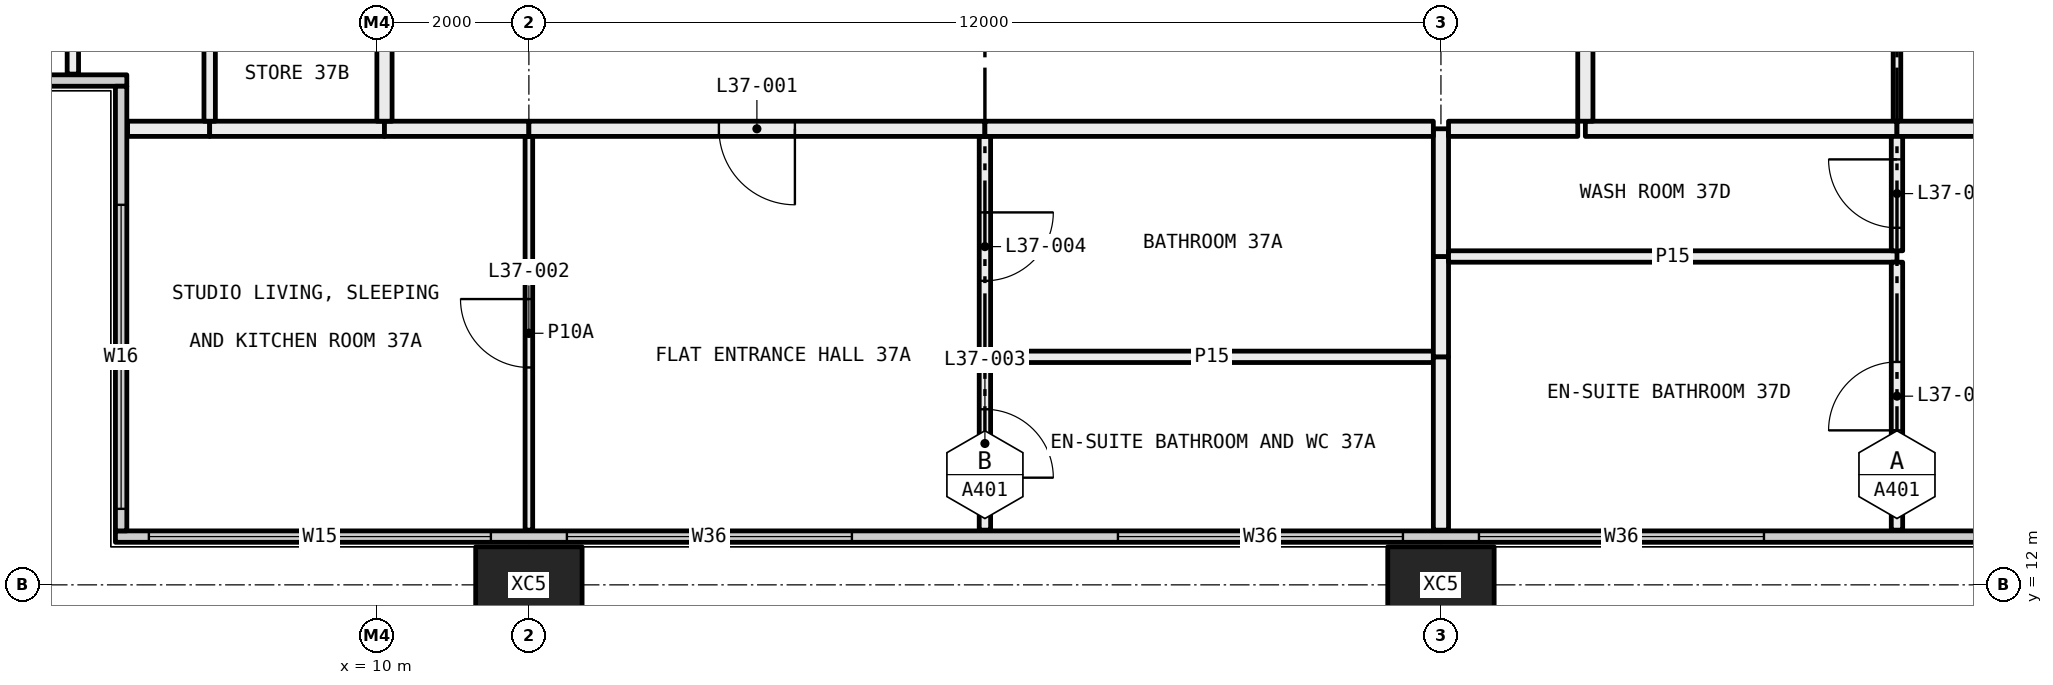
"""IFC4 building model, lengths in metres.
Left out: names, types, materials, properties, quantities, classifications, styles, units other than length and angle.
Written with IfcOpenShell. Run it as: python <this file> out.ifc"""

import sys

from ifc_helpers import new_model, si_unit, direction, frame, frame_2d, origin, origin_2d, place, context, subcontext, project, spatial, rectangle, hollow_rectangle, extrude, element, fill, save


model = new_model("IFC4")
c1 = context("Model", 3, precision=1e-05, world=origin(), true_north=direction((0.0, 1.0)))
c2 = subcontext(c1, "Body", "Model", "MODEL_VIEW")
j1 = project(units=[si_unit("LENGTHUNIT", "METRE"), si_unit("PLANEANGLEUNIT", "RADIAN")], contexts=[c1])
p1 = place(None, origin())
s1 = spatial("IfcSite", under=j1, at=p1, CompositionType="ELEMENT")
p2 = place(p1, origin())
s2 = spatial("IfcBuilding", under=s1, at=p2, CompositionType="ELEMENT")
p3 = place(p2, frame((0.0, 0.0, 141.45)))
s3 = spatial("IfcBuildingStorey", under=s2, at=p3, CompositionType="ELEMENT", Elevation=141.45)
for number, where, z_axis, x_axis in (
    (1, (12.0, 12.0, -0.4), (0.0, 0.0, 1.0), (1.0, 0.0, 0.0)),
    (2, (24.0, 12.0, -0.4), (0.0, 0.0, 1.0), (1.0, 0.0, 0.0)),
):
    element("IfcColumn", number, at=place(p3, frame(where, z_axis=z_axis, x_axis=x_axis)), inside=s3, PredefinedType="COLUMN", context=c2, shape_type="SweptSolid", body=[
        extrude(hollow_rectangle(XDim=1.4, YDim=1.0, WallThickness=0.055, at=origin_2d()), origin(), (0.0, 0.0, 1.0), 3.45),
    ])
p4 = place(p3, frame((6.56, 12.635, 0.0), z_axis=(0.0, 0.0, 1.0), x_axis=(1.0, 0.0, 0.0)))
e3 = element("IfcWall", 3, at=p4, inside=s3, PredefinedType="ELEMENTEDWALL", context=c2, shape_type="SweptSolid", body=[
    extrude(rectangle(XDim=58.88, YDim=0.15, at=frame_2d((29.44, 0.0))), origin(), (0.0, 0.0, 1.0), 3.05),
])
p5 = place(p4, frame((0.44, 0.0, 0.45)))
e4 = element("IfcOpeningElement", 4, at=p5, cuts=e3, PredefinedType="OPENING", context=c2, shape_type="SweptSolid", body=[
    extrude(rectangle(XDim=4.5, YDim=2.55, at=frame_2d((2.25, 1.275))), frame((0.0, 0.085, 0.0), z_axis=(0.0, -1.0, 0.0), x_axis=(1.0, 0.0, 0.0)), (0.0, 0.0, 1.0), 0.17),
])
p6 = place(p4, frame((5.94, 0.0, 0.45)))
e5 = element("IfcOpeningElement", 5, at=p6, cuts=e3, PredefinedType="OPENING", context=c2, shape_type="SweptSolid", body=[
    extrude(rectangle(XDim=3.75, YDim=2.55, at=frame_2d((1.875, 1.275))), frame((0.0, 0.085, 0.0), z_axis=(0.0, -1.0, 0.0), x_axis=(1.0, 0.0, 0.0)), (0.0, 0.0, 1.0), 0.17),
])
p7 = place(p4, frame((13.19, 0.0, 0.45)))
e6 = element("IfcOpeningElement", 6, at=p7, cuts=e3, PredefinedType="OPENING", context=c2, shape_type="SweptSolid", body=[
    extrude(rectangle(XDim=3.75, YDim=2.55, at=frame_2d((1.875, 1.275))), frame((0.0, 0.085, 0.0), z_axis=(0.0, -1.0, 0.0), x_axis=(1.0, 0.0, 0.0)), (0.0, 0.0, 1.0), 0.17),
])
p8 = place(p4, frame((17.94, 0.0, 0.45)))
e7 = element("IfcOpeningElement", 7, at=p8, cuts=e3, PredefinedType="OPENING", context=c2, shape_type="SweptSolid", body=[
    extrude(rectangle(XDim=3.75, YDim=2.55, at=frame_2d((1.875, 1.275))), frame((0.0, 0.085, 0.0), z_axis=(0.0, -1.0, 0.0), x_axis=(1.0, 0.0, 0.0)), (0.0, 0.0, 1.0), 0.17),
])
p9 = place(p4, frame((25.19, 0.0, 0.45)))
e8 = element("IfcOpeningElement", 8, at=p9, cuts=e3, PredefinedType="OPENING", context=c2, shape_type="SweptSolid", body=[
    extrude(rectangle(XDim=0.75, YDim=2.55, at=frame_2d((0.375, 1.275))), frame((0.0, 0.085, 0.0), z_axis=(0.0, -1.0, 0.0), x_axis=(1.0, 0.0, 0.0)), (0.0, 0.0, 1.0), 0.17),
])
p10 = place(p4, frame((26.94, 0.0, 0.45)))
e9 = element("IfcOpeningElement", 9, at=p10, cuts=e3, PredefinedType="OPENING", context=c2, shape_type="SweptSolid", body=[
    extrude(rectangle(XDim=2.0, YDim=2.55, at=frame_2d((1.0, 1.275))), frame((0.0, 0.085, 0.0), z_axis=(0.0, -1.0, 0.0), x_axis=(1.0, 0.0, 0.0)), (0.0, 0.0, 1.0), 0.17),
])
p11 = place(p4, frame((29.94, 0.0, 0.45)))
e10 = element("IfcOpeningElement", 10, at=p11, cuts=e3, PredefinedType="OPENING", context=c2, shape_type="SweptSolid", body=[
    extrude(rectangle(XDim=3.75, YDim=2.55, at=frame_2d((1.875, 1.275))), frame((0.0, 0.085, 0.0), z_axis=(0.0, -1.0, 0.0), x_axis=(1.0, 0.0, 0.0)), (0.0, 0.0, 1.0), 0.17),
])
p12 = place(p4, frame((37.19, 0.0, 0.45)))
e11 = element("IfcOpeningElement", 11, at=p12, cuts=e3, PredefinedType="OPENING", context=c2, shape_type="SweptSolid", body=[
    extrude(rectangle(XDim=3.75, YDim=2.55, at=frame_2d((1.875, 1.275))), frame((0.0, 0.085, 0.0), z_axis=(0.0, -1.0, 0.0), x_axis=(1.0, 0.0, 0.0)), (0.0, 0.0, 1.0), 0.17),
])
p13 = place(p4, frame((41.94, 0.0, 0.45)))
e12 = element("IfcOpeningElement", 12, at=p13, cuts=e3, PredefinedType="OPENING", context=c2, shape_type="SweptSolid", body=[
    extrude(rectangle(XDim=3.75, YDim=2.55, at=frame_2d((1.875, 1.275))), frame((0.0, 0.085, 0.0), z_axis=(0.0, -1.0, 0.0), x_axis=(1.0, 0.0, 0.0)), (0.0, 0.0, 1.0), 0.17),
])
p14 = place(p4, frame((49.19, 0.0, 0.45)))
e13 = element("IfcOpeningElement", 13, at=p14, cuts=e3, PredefinedType="OPENING", context=c2, shape_type="SweptSolid", body=[
    extrude(rectangle(XDim=0.75, YDim=2.55, at=frame_2d((0.375, 1.275))), frame((0.0, 0.085, 0.0), z_axis=(0.0, -1.0, 0.0), x_axis=(1.0, 0.0, 0.0)), (0.0, 0.0, 1.0), 0.17),
])
p15 = place(p4, frame((50.94, 0.0, 0.45)))
e14 = element("IfcOpeningElement", 14, at=p15, cuts=e3, PredefinedType="OPENING", context=c2, shape_type="SweptSolid", body=[
    extrude(rectangle(XDim=2.0, YDim=2.55, at=frame_2d((1.0, 1.275))), frame((0.0, 0.085, 0.0), z_axis=(0.0, -1.0, 0.0), x_axis=(1.0, 0.0, 0.0)), (0.0, 0.0, 1.0), 0.17),
])
p16 = place(p4, frame((53.94, 0.0, 0.45)))
e15 = element("IfcOpeningElement", 15, at=p16, cuts=e3, PredefinedType="OPENING", context=c2, shape_type="SweptSolid", body=[
    extrude(rectangle(XDim=4.5, YDim=2.55, at=frame_2d((2.25, 1.275))), frame((0.0, 0.085, 0.0), z_axis=(0.0, -1.0, 0.0), x_axis=(1.0, 0.0, 0.0)), (0.0, 0.0, 1.0), 0.17),
])
p17 = place(p3, frame((0.56, 18.635, 0.0), z_axis=(0.0, 0.0, 1.0), x_axis=(1.0, 0.0, 0.0)))
e16 = element("IfcWall", 16, at=p17, inside=s3, PredefinedType="ELEMENTEDWALL", context=c2, shape_type="SweptSolid", body=[
    extrude(rectangle(XDim=6.15, YDim=0.15, at=frame_2d((3.075, 0.0))), origin(), (0.0, 0.0, 1.0), 3.05),
])
p18 = place(p17, frame((0.44, 0.0, 0.45)))
e17 = element("IfcOpeningElement", 17, at=p18, cuts=e16, PredefinedType="OPENING", context=c2, shape_type="SweptSolid", body=[
    extrude(rectangle(XDim=4.0, YDim=2.55, at=frame_2d((2.0, 1.275))), frame((0.0, 0.085, 0.0), z_axis=(0.0, -1.0, 0.0), x_axis=(1.0, 0.0, 0.0)), (0.0, 0.0, 1.0), 0.17),
])
p19 = place(p3, frame((6.635, 12.71, 0.0), z_axis=(0.0, 0.0, 1.0), x_axis=(0.0, 1.0, 0.0)))
e18 = element("IfcWall", 18, at=p19, inside=s3, PredefinedType="ELEMENTEDWALL", context=c2, shape_type="SweptSolid", body=[
    extrude(rectangle(XDim=5.85, YDim=0.15, at=frame_2d((2.925, 0.0))), origin(), (0.0, 0.0, 1.0), 3.05),
])
p20 = place(p19, frame((0.29, 0.0, 0.45)))
e19 = element("IfcOpeningElement", 19, at=p20, cuts=e18, PredefinedType="OPENING", context=c2, shape_type="SweptSolid", body=[
    extrude(rectangle(XDim=4.0, YDim=2.55, at=frame_2d((2.0, 1.275))), frame((0.0, 0.085, 0.0), z_axis=(0.0, -1.0, 0.0), x_axis=(1.0, 0.0, 0.0)), (0.0, 0.0, 1.0), 0.17),
])
p21 = place(p3, frame((12.0, 12.72, 0.0), z_axis=(0.0, 0.0, 1.0), x_axis=(0.0, 1.0, 0.0)))
e20 = element("IfcWall", 20, at=p21, inside=s3, PredefinedType="PARTITIONING", context=c2, shape_type="SweptSolid", body=[
    extrude(rectangle(XDim=5.18, YDim=0.1, at=frame_2d((2.59, 0.0))), origin(), (0.0, 0.0, 1.0), 3.05),
])
p22 = place(p21, frame((2.14, 0.0, 0.0)))
e21 = element("IfcOpeningElement", 21, at=p22, cuts=e20, PredefinedType="OPENING", context=c2, shape_type="SweptSolid", body=[
    extrude(rectangle(XDim=0.9, YDim=2.1, at=frame_2d((0.45, 1.05))), frame((0.0, 0.06, 0.0), z_axis=(0.0, -1.0, 0.0), x_axis=(1.0, 0.0, 0.0)), (0.0, 0.0, 1.0), 0.12),
])
p23 = place(p3, frame((7.8, 18.0, 0.0), z_axis=(0.0, 0.0, 1.0), x_axis=(-1.0, 0.0, 0.0)))
e22 = element("IfcWall", 22, at=p23, inside=s3, PredefinedType="PARTITIONING", context=c2, shape_type="SweptSolid", body=[
    extrude(rectangle(XDim=1.08, YDim=0.2, at=frame_2d((0.54, 0.0))), origin(), (0.0, 0.0, 1.0), 3.05),
])
p24 = place(p3, frame((10.1, 18.0, 0.0), z_axis=(0.0, 0.0, 1.0), x_axis=(-1.0, 0.0, 0.0)))
e23 = element("IfcWall", 23, at=p24, inside=s3, PredefinedType="PARTITIONING", context=c2, shape_type="SweptSolid", body=[
    extrude(rectangle(XDim=2.3, YDim=0.2, at=frame_2d((1.15, 0.0))), origin(), (0.0, 0.0, 1.0), 3.05),
])
p25 = place(p3, frame((12.0, 18.0, 0.0), z_axis=(0.0, 0.0, 1.0), x_axis=(-1.0, 0.0, 0.0)))
e24 = element("IfcWall", 24, at=p25, inside=s3, PredefinedType="PARTITIONING", context=c2, shape_type="SweptSolid", body=[
    extrude(rectangle(XDim=1.9, YDim=0.2, at=frame_2d((0.95, 0.0))), origin(), (0.0, 0.0, 1.0), 3.05),
])
p26 = place(p3, frame((18.0, 12.72, 0.0), z_axis=(0.0, 0.0, 1.0), x_axis=(0.0, 1.0, 0.0)))
e25 = element("IfcWall", 25, at=p26, inside=s3, PredefinedType="PARTITIONING", context=c2, shape_type="SweptSolid", body=[
    extrude(rectangle(XDim=2.28, YDim=0.15, at=frame_2d((1.14, 0.0))), origin(), (0.0, 0.0, 1.0), 3.05),
])
p27 = place(p26, frame((0.69, 0.0, 0.0)))
e26 = element("IfcOpeningElement", 26, at=p27, cuts=e25, PredefinedType="OPENING", context=c2, shape_type="SweptSolid", body=[
    extrude(rectangle(XDim=0.9, YDim=2.1, at=frame_2d((0.45, 1.05))), frame((0.0, 0.085, 0.0), z_axis=(0.0, -1.0, 0.0), x_axis=(1.0, 0.0, 0.0)), (0.0, 0.0, 1.0), 0.17),
])
p28 = place(p3, frame((18.0, 15.0, 0.0), z_axis=(0.0, 0.0, 1.0), x_axis=(0.0, 1.0, 0.0)))
e27 = element("IfcWall", 27, at=p28, inside=s3, PredefinedType="PARTITIONING", context=c2, shape_type="SweptSolid", body=[
    extrude(rectangle(XDim=2.9, YDim=0.15, at=frame_2d((1.45, 0.0))), origin(), (0.0, 0.0, 1.0), 3.05),
])
p29 = place(p28, frame((1.0, 0.0, 0.0)))
e28 = element("IfcOpeningElement", 28, at=p29, cuts=e27, PredefinedType="OPENING", context=c2, shape_type="SweptSolid", body=[
    extrude(rectangle(XDim=0.9, YDim=2.1, at=frame_2d((0.45, 1.05))), frame((0.0, 0.085, 0.0), z_axis=(0.0, -1.0, 0.0), x_axis=(1.0, 0.0, 0.0)), (0.0, 0.0, 1.0), 0.17),
])
p30 = place(p3, frame((18.0, 18.0, 0.0), z_axis=(0.0, 0.0, 1.0), x_axis=(-1.0, 0.0, 0.0)))
e29 = element("IfcWall", 29, at=p30, inside=s3, PredefinedType="PARTITIONING", context=c2, shape_type="SweptSolid", body=[
    extrude(rectangle(XDim=6.0, YDim=0.2, at=frame_2d((3.0, 0.0))), origin(), (0.0, 0.0, 1.0), 3.05),
])
p31 = place(p30, frame((2.5, 0.0, 0.0)))
e30 = element("IfcOpeningElement", 30, at=p31, cuts=e29, PredefinedType="OPENING", context=c2, shape_type="SweptSolid", body=[
    extrude(rectangle(XDim=1.0, YDim=2.1, at=frame_2d((0.5, 1.05))), frame((0.0, 0.11, 0.0), z_axis=(0.0, -1.0, 0.0), x_axis=(1.0, 0.0, 0.0)), (0.0, 0.0, 1.0), 0.22),
])
p32 = place(p3, frame((23.9, 15.0, 0.0), z_axis=(0.0, 0.0, 1.0), x_axis=(-1.0, 0.0, 0.0)))
e31 = element("IfcWall", 31, at=p32, inside=s3, PredefinedType="PARTITIONING", context=c2, shape_type="SweptSolid", body=[
    extrude(rectangle(XDim=5.825, YDim=0.15, at=frame_2d((2.913, 0.0))), origin(), (0.0, 0.0, 1.0), 3.05),
])
p33 = place(p3, frame((24.0, 12.72, 0.0), z_axis=(0.0, 0.0, 1.0), x_axis=(0.0, 1.0, 0.0)))
e32 = element("IfcWall", 32, at=p33, inside=s3, PredefinedType="PARTITIONING", context=c2, shape_type="SweptSolid", body=[
    extrude(rectangle(XDim=2.28, YDim=0.2, at=frame_2d((1.14, 0.0))), origin(), (0.0, 0.0, 1.0), 3.05),
])
p34 = place(p3, frame((24.0, 15.0, 0.0), z_axis=(0.0, 0.0, 1.0), x_axis=(0.0, 1.0, 0.0)))
e33 = element("IfcWall", 33, at=p34, inside=s3, PredefinedType="PARTITIONING", context=c2, shape_type="SweptSolid", body=[
    extrude(rectangle(XDim=1.32, YDim=0.2, at=frame_2d((0.66, 0.0))), origin(), (0.0, 0.0, 1.0), 3.05),
])
p35 = place(p3, frame((24.0, 16.32, 0.0), z_axis=(0.0, 0.0, 1.0), x_axis=(0.0, 1.0, 0.0)))
e34 = element("IfcWall", 34, at=p35, inside=s3, PredefinedType="PARTITIONING", context=c2, shape_type="SweptSolid", body=[
    extrude(rectangle(XDim=1.68, YDim=0.2, at=frame_2d((0.84, 0.0))), origin(), (0.0, 0.0, 1.0), 3.05),
])
p36 = place(p3, frame((23.9, 18.0, 0.0), z_axis=(0.0, 0.0, 1.0), x_axis=(-1.0, 0.0, 0.0)))
e35 = element("IfcWall", 35, at=p36, inside=s3, PredefinedType="PARTITIONING", context=c2, shape_type="SweptSolid", body=[
    extrude(rectangle(XDim=5.9, YDim=0.2, at=frame_2d((2.95, 0.0))), origin(), (0.0, 0.0, 1.0), 3.05),
])
p37 = place(p3, frame((6.0, 18.72, 0.0), z_axis=(0.0, 0.0, 1.0), x_axis=(0.0, 1.0, 0.0)))
e36 = element("IfcWall", 36, at=p37, inside=s3, PredefinedType="PARTITIONING", context=c2, shape_type="SweptSolid", body=[
    extrude(rectangle(XDim=2.28, YDim=0.15, at=frame_2d((1.14, 0.0))), origin(), (0.0, 0.0, 1.0), 3.05),
])
p38 = place(p3, frame((7.8, 18.1, 0.0), z_axis=(0.0, 0.0, 1.0), x_axis=(0.0, 1.0, 0.0)))
e37 = element("IfcWall", 37, at=p38, inside=s3, PredefinedType="PARTITIONING", context=c2, shape_type="SweptSolid", body=[
    extrude(rectangle(XDim=2.9, YDim=0.15, at=frame_2d((1.45, 0.0))), origin(), (0.0, 0.0, 1.0), 3.05),
])
p39 = place(p3, frame((10.1, 18.1, 0.0), z_axis=(0.0, 0.0, 1.0), x_axis=(0.0, 1.0, 0.0)))
e38 = element("IfcWall", 38, at=p39, inside=s3, PredefinedType="PARTITIONING", context=c2, shape_type="SweptSolid", body=[
    extrude(rectangle(XDim=2.9, YDim=0.2, at=frame_2d((1.45, 0.0))), origin(), (0.0, 0.0, 1.0), 3.05),
])
p40 = place(p3, frame((30.0, 18.1, 0.0), z_axis=(0.0, 0.0, 1.0), x_axis=(0.0, 1.0, 0.0)))
e39 = element("IfcWall", 39, at=p40, inside=s3, PredefinedType="PARTITIONING", context=c2, shape_type="SweptSolid", body=[
    extrude(rectangle(XDim=6.2, YDim=0.1, at=frame_2d((3.1, 0.0))), origin(), (0.0, 0.0, 1.0), 2.45),
])
p41 = place(p3, frame((25.9, 18.0, 0.0), z_axis=(0.0, 0.0, 1.0), x_axis=(1.0, 0.0, 0.0)))
e40 = element("IfcWall", 40, at=p41, inside=s3, PredefinedType="PARTITIONING", context=c2, shape_type="SweptSolid", body=[
    extrude(rectangle(XDim=4.1, YDim=0.2, at=frame_2d((2.05, 0.0))), origin(), (0.0, 0.0, 1.0), 3.05),
])
p42 = place(p3, frame((25.9, 23.9, 0.0), z_axis=(0.0, 0.0, 1.0), x_axis=(0.0, -1.0, 0.0)))
e41 = element("IfcWall", 41, at=p42, inside=s3, PredefinedType="PARTITIONING", context=c2, shape_type="SweptSolid", body=[
    extrude(rectangle(XDim=5.8, YDim=0.2, at=frame_2d((2.9, 0.0))), origin(), (0.0, 0.0, 1.0), 3.05),
])
p43 = place(p3, frame((30.0, 18.0, 0.0), z_axis=(0.0, 0.0, 1.0), x_axis=(1.0, 0.0, 0.0)))
e42 = element("IfcWall", 42, at=p43, inside=s3, PredefinedType="PARTITIONING", context=c2, shape_type="SweptSolid", body=[
    extrude(rectangle(XDim=6.0, YDim=0.2, at=frame_2d((3.0, 0.0))), origin(), (0.0, 0.0, 1.0), 2.45),
])
p44 = place(p3, frame((30.0, 16.32, 0.0), z_axis=(0.0, 0.0, 1.0), x_axis=(-1.0, 0.0, 0.0)))
e43 = element("IfcWall", 43, at=p44, inside=s3, PredefinedType="PARTITIONING", context=c2, shape_type="SweptSolid", body=[
    extrude(rectangle(XDim=5.9, YDim=0.15, at=frame_2d((2.95, 0.0))), origin(), (0.0, 0.0, 1.0), 3.05),
])
p45 = place(p3, frame((30.0, 12.72, 0.0), z_axis=(0.0, 0.0, 1.0), x_axis=(0.0, 1.0, 0.0)))
e44 = element("IfcWall", 44, at=p45, inside=s3, PredefinedType="PARTITIONING", context=c2, shape_type="SweptSolid", body=[
    extrude(rectangle(XDim=3.525, YDim=0.15, at=frame_2d((1.763, 0.0))), origin(), (0.0, 0.0, 1.0), 3.05),
])
p46 = place(p45, frame((1.312, 0.0, 0.0)))
e45 = element("IfcOpeningElement", 45, at=p46, cuts=e44, PredefinedType="OPENING", context=c2, shape_type="SweptSolid", body=[
    extrude(rectangle(XDim=0.9, YDim=2.1, at=frame_2d((0.45, 1.05))), frame((0.0, 0.085, 0.0), z_axis=(0.0, -1.0, 0.0), x_axis=(1.0, 0.0, 0.0)), (0.0, 0.0, 1.0), 0.17),
])
p47 = place(p3, frame((30.0, 16.395, 0.0), z_axis=(0.0, 0.0, 1.0), x_axis=(0.0, 1.0, 0.0)))
e46 = element("IfcWall", 46, at=p47, inside=s3, PredefinedType="PARTITIONING", context=c2, shape_type="SweptSolid", body=[
    extrude(rectangle(XDim=1.505, YDim=0.15, at=frame_2d((0.752, 0.0))), origin(), (0.0, 0.0, 1.0), 3.05),
])
p48 = place(p47, frame((0.302, 0.0, 0.0)))
e47 = element("IfcOpeningElement", 47, at=p48, cuts=e46, PredefinedType="OPENING", context=c2, shape_type="SweptSolid", body=[
    extrude(rectangle(XDim=0.9, YDim=2.1, at=frame_2d((0.45, 1.05))), frame((0.0, 0.085, 0.0), z_axis=(0.0, -1.0, 0.0), x_axis=(1.0, 0.0, 0.0)), (0.0, 0.0, 1.0), 0.17),
])
p49 = place(p3, frame((25.8, 18.0, 0.0), z_axis=(0.0, 0.0, 1.0), x_axis=(-1.0, 0.0, 0.0)))
e48 = element("IfcWall", 48, at=p49, inside=s3, PredefinedType="PARTITIONING", context=c2, shape_type="SweptSolid", body=[
    extrude(rectangle(XDim=1.7, YDim=0.2, at=frame_2d((0.85, 0.0))), origin(), (0.0, 0.0, 1.0), 3.05),
])
p50 = place(p5, origin())
e49 = element("IfcWindow", 49, at=p50, inside=s3, PartitioningType="SINGLE_PANEL", PredefinedType="WINDOW", context=c2, shape_type="SweptSolid", body=[
    extrude(rectangle(XDim=4.5, YDim=2.55, at=frame_2d((2.25, 1.275))), frame((0.0, 0.03, 0.0), z_axis=(0.0, -1.0, 0.0), x_axis=(1.0, 0.0, 0.0)), (0.0, 0.0, 1.0), 0.06),
])
fill(e4, e49)
p51 = place(p6, origin())
e50 = element("IfcWindow", 50, at=p51, inside=s3, PartitioningType="SINGLE_PANEL", PredefinedType="WINDOW", context=c2, shape_type="SweptSolid", body=[
    extrude(rectangle(XDim=3.75, YDim=2.55, at=frame_2d((1.875, 1.275))), frame((0.0, 0.03, 0.0), z_axis=(0.0, -1.0, 0.0), x_axis=(1.0, 0.0, 0.0)), (0.0, 0.0, 1.0), 0.06),
])
fill(e5, e50)
p52 = place(p7, origin())
e51 = element("IfcWindow", 51, at=p52, inside=s3, PartitioningType="SINGLE_PANEL", PredefinedType="WINDOW", context=c2, shape_type="SweptSolid", body=[
    extrude(rectangle(XDim=3.75, YDim=2.55, at=frame_2d((1.875, 1.275))), frame((0.0, 0.03, 0.0), z_axis=(0.0, -1.0, 0.0), x_axis=(1.0, 0.0, 0.0)), (0.0, 0.0, 1.0), 0.06),
])
fill(e6, e51)
p53 = place(p8, origin())
e52 = element("IfcWindow", 52, at=p53, inside=s3, PartitioningType="SINGLE_PANEL", PredefinedType="WINDOW", context=c2, shape_type="SweptSolid", body=[
    extrude(rectangle(XDim=3.75, YDim=2.55, at=frame_2d((1.875, 1.275))), frame((0.0, 0.03, 0.0), z_axis=(0.0, -1.0, 0.0), x_axis=(1.0, 0.0, 0.0)), (0.0, 0.0, 1.0), 0.06),
])
fill(e7, e52)
p54 = place(p20, origin())
e53 = element("IfcWindow", 53, at=p54, inside=s3, PartitioningType="SINGLE_PANEL", PredefinedType="WINDOW", context=c2, shape_type="SweptSolid", body=[
    extrude(rectangle(XDim=4.0, YDim=2.55, at=frame_2d((2.0, 1.275))), frame((0.0, 0.03, 0.0), z_axis=(0.0, -1.0, 0.0), x_axis=(1.0, 0.0, 0.0)), (0.0, 0.0, 1.0), 0.06),
])
fill(e19, e53)
p55 = place(p31, origin())
e54 = element("IfcDoor", 54, at=p55, inside=s3, OperationType="SINGLE_SWING_RIGHT", PredefinedType="DOOR", context=c2, shape_type="SweptSolid", body=[
    extrude(rectangle(XDim=1.0, YDim=2.1, at=frame_2d((0.5, 1.05))), frame((0.0, 0.025, 0.0), z_axis=(0.0, -1.0, 0.0), x_axis=(1.0, 0.0, 0.0)), (0.0, 0.0, 1.0), 0.05),
])
fill(e30, e54)
p56 = place(p22, origin())
e55 = element("IfcDoor", 55, at=p56, inside=s3, OperationType="SINGLE_SWING_LEFT", PredefinedType="DOOR", context=c2, shape_type="SweptSolid", body=[
    extrude(rectangle(XDim=0.9, YDim=2.1, at=frame_2d((0.45, 1.05))), frame((0.0, 0.025, 0.0), z_axis=(0.0, -1.0, 0.0), x_axis=(1.0, 0.0, 0.0)), (0.0, 0.0, 1.0), 0.05),
])
fill(e21, e55)
p57 = place(p27, frame((0.9, 0.0, 0.0), x_axis=(-1.0, 0.0, 0.0)))
e56 = element("IfcDoor", 56, at=p57, inside=s3, OperationType="SINGLE_SWING_LEFT", PredefinedType="DOOR", context=c2, shape_type="SweptSolid", body=[
    extrude(rectangle(XDim=0.9, YDim=2.1, at=frame_2d((0.45, 1.05))), frame((0.0, 0.025, 0.0), z_axis=(0.0, -1.0, 0.0), x_axis=(1.0, 0.0, 0.0)), (0.0, 0.0, 1.0), 0.05),
])
fill(e26, e56)
p58 = place(p29, frame((0.9, 0.0, 0.0), x_axis=(-1.0, 0.0, 0.0)))
e57 = element("IfcDoor", 57, at=p58, inside=s3, OperationType="SINGLE_SWING_RIGHT", PredefinedType="DOOR", context=c2, shape_type="SweptSolid", body=[
    extrude(rectangle(XDim=0.9, YDim=2.1, at=frame_2d((0.45, 1.05))), frame((0.0, 0.025, 0.0), z_axis=(0.0, -1.0, 0.0), x_axis=(1.0, 0.0, 0.0)), (0.0, 0.0, 1.0), 0.05),
])
fill(e28, e57)
p59 = place(p46, origin())
e58 = element("IfcDoor", 58, at=p59, inside=s3, OperationType="SINGLE_SWING_RIGHT", PredefinedType="DOOR", context=c2, shape_type="SweptSolid", body=[
    extrude(rectangle(XDim=0.9, YDim=2.1, at=frame_2d((0.45, 1.05))), frame((0.0, 0.025, 0.0), z_axis=(0.0, -1.0, 0.0), x_axis=(1.0, 0.0, 0.0)), (0.0, 0.0, 1.0), 0.05),
])
fill(e45, e58)
p60 = place(p48, origin())
e59 = element("IfcDoor", 59, at=p60, inside=s3, OperationType="SINGLE_SWING_LEFT", PredefinedType="DOOR", context=c2, shape_type="SweptSolid", body=[
    extrude(rectangle(XDim=0.9, YDim=2.1, at=frame_2d((0.45, 1.05))), frame((0.0, 0.025, 0.0), z_axis=(0.0, -1.0, 0.0), x_axis=(1.0, 0.0, 0.0)), (0.0, 0.0, 1.0), 0.05),
])
fill(e47, e59)
save(model, sys.argv[1])
